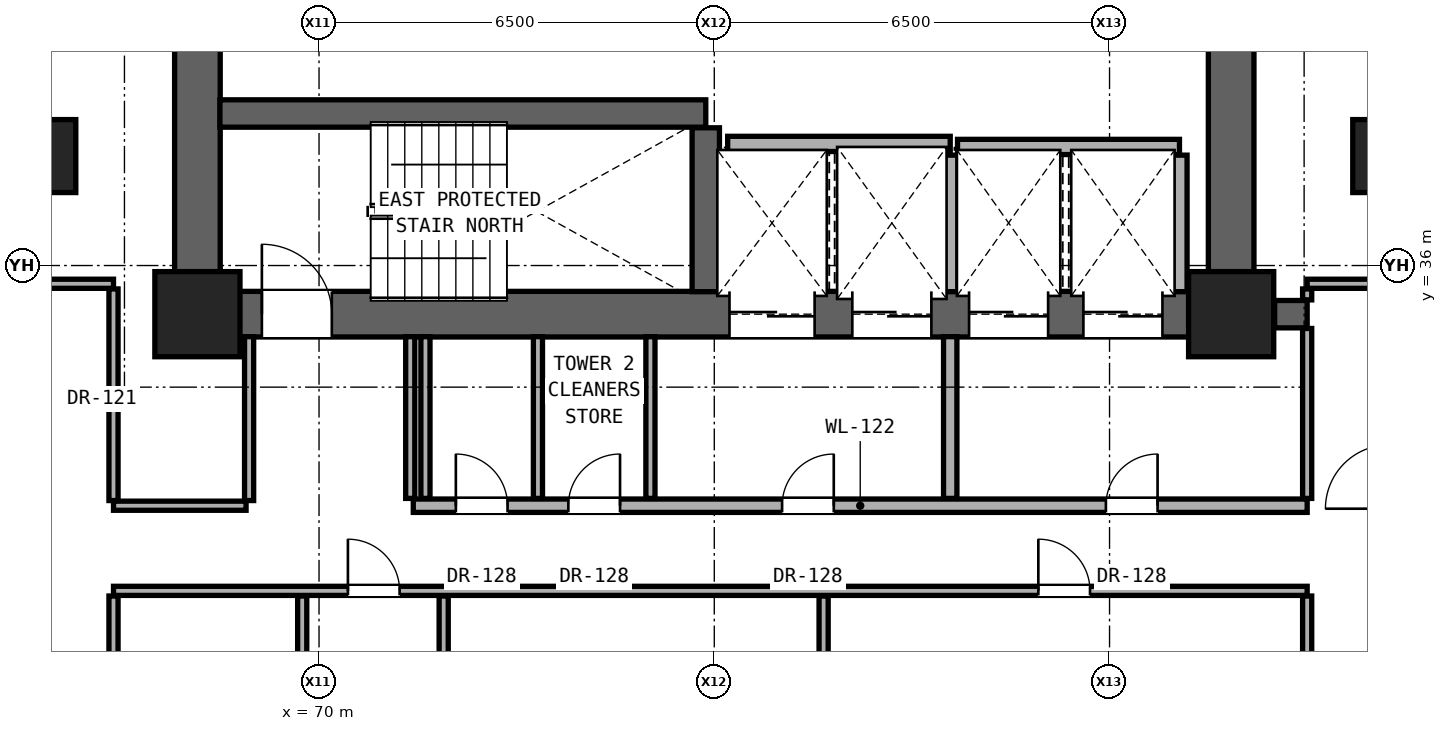
"""IFC4 building model, lengths in metres.
Left out: names, types, materials, properties, quantities, classifications, styles, units other than length and angle.
Written with IfcOpenShell. Run it as: python <this file> out.ifc"""

import sys

from ifc_helpers import new_model, si_unit, direction, frame, frame_2d, origin, origin_2d, place, context, subcontext, project, spatial, rectangle, extrude, element, fill, save


model = new_model("IFC4")
c1 = context("Model", 3, precision=1e-05, world=origin(), true_north=direction((0.0, 1.0)))
c2 = subcontext(c1, "Body", "Model", "MODEL_VIEW")
j1 = project(units=[si_unit("LENGTHUNIT", "METRE"), si_unit("PLANEANGLEUNIT", "RADIAN")], contexts=[c1])
p1 = place(None, origin())
s1 = spatial("IfcSite", under=j1, at=p1, CompositionType="ELEMENT")
p2 = place(p1, origin())
s2 = spatial("IfcBuilding", under=s1, at=p2, CompositionType="ELEMENT")
p3 = place(p2, frame((0.0, 0.0, 25.7)))
s3 = spatial("IfcBuildingStorey", under=s2, at=p3, CompositionType="ELEMENT", Elevation=25.7)
for number, where, z_axis, x_axis in (
    (1, (68.0, 35.2, 0.0), (0.0, 0.0, 1.0), (1.0, 0.0, 0.0)),
    (2, (85.0, 35.2, 0.0), (0.0, 0.0, 1.0), (1.0, 0.0, 0.0)),
):
    element("IfcColumn", number, at=place(p3, frame(where, z_axis=z_axis, x_axis=x_axis)), inside=s3, PredefinedType="COLUMN", context=c2, shape_type="SweptSolid", body=[
        extrude(rectangle(XDim=1.4, YDim=1.4, at=origin_2d()), origin(), (0.0, 0.0, 1.0), 3.3),
    ])
for number, where, z_axis, x_axis in (
    (3, (65.6, 37.8, 0.0), (0.0, 0.0, 1.0), (1.0, 0.0, 0.0)),
    (4, (87.4, 37.8, 0.0), (0.0, 0.0, 1.0), (1.0, 0.0, 0.0)),
):
    element("IfcColumn", number, at=place(p3, frame(where, z_axis=z_axis, x_axis=x_axis)), inside=s3, PredefinedType="PILASTER", context=c2, shape_type="SweptSolid", body=[
        extrude(rectangle(XDim=0.8, YDim=1.2, at=origin_2d()), origin(), (0.0, 0.0, 1.0), 3.3),
    ])
for number, where, z_axis, x_axis in (
    (5, (68.0, 35.2, 0.0), (0.0, 0.0, 1.0), (0.0, 1.0, 0.0)),
    (6, (85.0, 35.2, 0.0), (0.0, 0.0, 1.0), (0.0, 1.0, 0.0)),
):
    element("IfcWall", number, at=place(p3, frame(where, z_axis=z_axis, x_axis=x_axis)), inside=s3, PredefinedType="SHEAR", context=c2, shape_type="SweptSolid", body=[
        extrude(rectangle(XDim=5.6, YDim=0.75, at=frame_2d((2.8, 0.0))), origin(), (0.0, 0.0, 1.0), 3.06),
    ])
p4 = place(p3, frame((68.0, 35.2, 0.0), z_axis=(0.0, 0.0, 1.0), x_axis=(1.0, 0.0, 0.0)))
e7 = element("IfcWall", 7, at=p4, inside=s3, PredefinedType="SHEAR", context=c2, shape_type="SweptSolid", body=[
    extrude(rectangle(XDim=17.0, YDim=0.75, at=frame_2d((8.5, 0.0))), origin(), (0.0, 0.0, 1.0), 3.06),
])
p5 = place(p4, frame((1.06, 0.0, 0.0)))
e8 = element("IfcOpeningElement", 8, at=p5, cuts=e7, PredefinedType="OPENING", context=c2, shape_type="SweptSolid", body=[
    extrude(rectangle(XDim=1.15, YDim=2.2, at=frame_2d((0.575, 1.1))), frame((0.0, 0.385, 0.0), z_axis=(0.0, -1.0, 0.0), x_axis=(1.0, 0.0, 0.0)), (0.0, 0.0, 1.0), 0.77),
])
p6 = place(p4, frame((8.75, 0.0, 0.0)))
e9 = element("IfcOpeningElement", 9, at=p6, cuts=e7, PredefinedType="OPENING", context=c2, shape_type="SweptSolid", body=[
    extrude(rectangle(XDim=1.4, YDim=2.35, at=frame_2d((0.7, 1.175))), frame((0.0, 0.385, 0.0), z_axis=(0.0, -1.0, 0.0), x_axis=(1.0, 0.0, 0.0)), (0.0, 0.0, 1.0), 0.77),
])
p7 = place(p4, frame((10.77, 0.0, 0.0)))
e10 = element("IfcOpeningElement", 10, at=p7, cuts=e7, PredefinedType="OPENING", context=c2, shape_type="SweptSolid", body=[
    extrude(rectangle(XDim=1.3, YDim=2.3, at=frame_2d((0.65, 1.15))), frame((0.0, 0.385, 0.0), z_axis=(0.0, -1.0, 0.0), x_axis=(1.0, 0.0, 0.0)), (0.0, 0.0, 1.0), 0.77),
])
p8 = place(p4, frame((12.69, 0.0, 0.0)))
e11 = element("IfcOpeningElement", 11, at=p8, cuts=e7, PredefinedType="OPENING", context=c2, shape_type="SweptSolid", body=[
    extrude(rectangle(XDim=1.3, YDim=2.3, at=frame_2d((0.65, 1.15))), frame((0.0, 0.385, 0.0), z_axis=(0.0, -1.0, 0.0), x_axis=(1.0, 0.0, 0.0)), (0.0, 0.0, 1.0), 0.77),
])
p9 = place(p4, frame((14.57, 0.0, 0.0)))
e12 = element("IfcOpeningElement", 12, at=p9, cuts=e7, PredefinedType="OPENING", context=c2, shape_type="SweptSolid", body=[
    extrude(rectangle(XDim=1.3, YDim=2.3, at=frame_2d((0.65, 1.15))), frame((0.0, 0.385, 0.0), z_axis=(0.0, -1.0, 0.0), x_axis=(1.0, 0.0, 0.0)), (0.0, 0.0, 1.0), 0.77),
])
p10 = place(p3, frame((66.62, 30.65, 0.0), z_axis=(0.0, 0.0, 1.0), x_axis=(1.0, 0.0, 0.0)))
e13 = element("IfcWall", 13, at=p10, inside=s3, PredefinedType="PARTITIONING", context=c2, shape_type="SweptSolid", body=[
    extrude(rectangle(XDim=19.63, YDim=0.15, at=frame_2d((9.815, 0.0))), origin(), (0.0, 0.0, 1.0), 2.125),
])
p11 = place(p10, frame((3.855, 0.0, 0.0)))
e14 = element("IfcOpeningElement", 14, at=p11, cuts=e13, PredefinedType="OPENING", context=c2, shape_type="SweptSolid", body=[
    extrude(rectangle(XDim=0.85, YDim=2.01, at=frame_2d((0.425, 1.005))), frame((0.0, 0.085, 0.0), z_axis=(0.0, -1.0, 0.0), x_axis=(1.0, 0.0, 0.0)), (0.0, 0.0, 1.0), 0.17),
])
p12 = place(p10, frame((15.209, 0.0, 0.0)))
e15 = element("IfcOpeningElement", 15, at=p12, cuts=e13, PredefinedType="OPENING", context=c2, shape_type="SweptSolid", body=[
    extrude(rectangle(XDim=0.85, YDim=2.01, at=frame_2d((0.425, 1.005))), frame((0.0, 0.085, 0.0), z_axis=(0.0, -1.0, 0.0), x_axis=(1.0, 0.0, 0.0)), (0.0, 0.0, 1.0), 0.17),
])
p13 = place(p3, frame((66.62, 32.05, 0.0), z_axis=(0.0, 0.0, 1.0), x_axis=(1.0, 0.0, 0.0)))
e16 = element("IfcWall", 16, at=p13, inside=s3, PredefinedType="PARTITIONING", context=c2, shape_type="SweptSolid", body=[
    extrude(rectangle(XDim=2.18, YDim=0.15, at=frame_2d((1.09, 0.0))), origin(), (0.0, 0.0, 1.0), 2.125),
])
p14 = place(p3, frame((71.55, 32.05, 0.0), z_axis=(0.0, 0.0, 1.0), x_axis=(1.0, 0.0, 0.0)))
e17 = element("IfcWall", 17, at=p14, inside=s3, PredefinedType="SOLIDWALL", context=c2, shape_type="SweptSolid", body=[
    extrude(rectangle(XDim=14.7, YDim=0.22, at=frame_2d((7.35, 0.0))), origin(), (0.0, 0.0, 1.0), 2.125),
])
p15 = place(p14, frame((11.39, 0.0, 0.0)))
e18 = element("IfcOpeningElement", 18, at=p15, cuts=e17, PredefinedType="OPENING", context=c2, shape_type="SweptSolid", body=[
    extrude(rectangle(XDim=0.85, YDim=2.01, at=frame_2d((0.425, 1.005))), frame((0.0, 0.12, 0.0), z_axis=(0.0, -1.0, 0.0), x_axis=(1.0, 0.0, 0.0)), (0.0, 0.0, 1.0), 0.24),
])
p16 = place(p14, frame((6.065, 0.0, 0.0)))
e19 = element("IfcOpeningElement", 19, at=p16, cuts=e17, PredefinedType="OPENING", context=c2, shape_type="SweptSolid", body=[
    extrude(rectangle(XDim=0.85, YDim=2.01, at=frame_2d((0.425, 1.005))), frame((0.0, 0.12, 0.0), z_axis=(0.0, -1.0, 0.0), x_axis=(1.0, 0.0, 0.0)), (0.0, 0.0, 1.0), 0.24),
])
p17 = place(p14, frame((0.7, 0.0, 0.0)))
e20 = element("IfcOpeningElement", 20, at=p17, cuts=e17, PredefinedType="OPENING", context=c2, shape_type="SweptSolid", body=[
    extrude(rectangle(XDim=0.85, YDim=2.01, at=frame_2d((0.425, 1.005))), frame((0.0, 0.12, 0.0), z_axis=(0.0, -1.0, 0.0), x_axis=(1.0, 0.0, 0.0)), (0.0, 0.0, 1.0), 0.24),
])
p18 = place(p14, frame((2.55, 0.0, 0.0)))
e21 = element("IfcOpeningElement", 21, at=p18, cuts=e17, PredefinedType="OPENING", context=c2, shape_type="SweptSolid", body=[
    extrude(rectangle(XDim=0.85, YDim=2.01, at=frame_2d((0.425, 1.005))), frame((0.0, 0.12, 0.0), z_axis=(0.0, -1.0, 0.0), x_axis=(1.0, 0.0, 0.0)), (0.0, 0.0, 1.0), 0.24),
])
p19 = place(p3, frame((85.715, 35.2, 0.0), z_axis=(0.0, 0.0, 1.0), x_axis=(1.0, 0.0, 0.0)))
e22 = element("IfcWall", 22, at=p19, inside=s3, PredefinedType="SHEAR", context=c2, shape_type="SweptSolid", body=[
    extrude(rectangle(XDim=0.535, YDim=0.45, at=frame_2d((0.268, 0.0))), origin(), (0.0, 0.0, 1.0), 3.06),
])
p20 = place(p3, frame((65.25, 35.7, 0.0), z_axis=(0.0, 0.0, 1.0), x_axis=(1.0, 0.0, 0.0)))
e23 = element("IfcWall", 23, at=p20, inside=s3, PredefinedType="PARTITIONING", context=c2, shape_type="SweptSolid", body=[
    extrude(rectangle(XDim=1.37, YDim=0.15, at=frame_2d((0.685, 0.0))), origin(), (0.0, 0.0, 1.0), 3.06),
])
p21 = place(p3, frame((86.25, 35.7, 0.0), z_axis=(0.0, 0.0, 1.0), x_axis=(1.0, 0.0, 0.0)))
e24 = element("IfcWall", 24, at=p21, inside=s3, PredefinedType="PARTITIONING", context=c2, shape_type="SweptSolid", body=[
    extrude(rectangle(XDim=1.35, YDim=0.15, at=frame_2d((0.675, 0.0))), origin(), (0.0, 0.0, 1.0), 3.06),
])
p22 = place(p3, frame((80.5, 37.95, 0.0), z_axis=(0.0, 0.0, 1.0), x_axis=(1.0, 0.0, 0.0)))
e25 = element("IfcWall", 25, at=p22, inside=s3, PredefinedType="SOLIDWALL", context=c2, shape_type="SweptSolid", body=[
    extrude(rectangle(XDim=3.65, YDim=0.25, at=frame_2d((1.825, 0.0))), origin(), (0.0, 0.0, 1.0), 3.06),
])
p23 = place(p3, frame((76.72, 38.0, 0.0), z_axis=(0.0, 0.0, 1.0), x_axis=(1.0, 0.0, 0.0)))
e26 = element("IfcWall", 26, at=p23, inside=s3, PredefinedType="SOLIDWALL", context=c2, shape_type="SweptSolid", body=[
    extrude(rectangle(XDim=3.66, YDim=0.25, at=frame_2d((1.83, 0.0))), origin(), (0.0, 0.0, 1.0), 3.06),
])
p24 = place(p3, frame((68.37, 38.5, 0.0), z_axis=(0.0, 0.0, 1.0), x_axis=(1.0, 0.0, 0.0)))
e27 = element("IfcWall", 27, at=p24, inside=s3, PredefinedType="SHEAR", context=c2, shape_type="SweptSolid", body=[
    extrude(rectangle(XDim=7.99, YDim=0.45, at=frame_2d((3.995, 0.0))), origin(), (0.0, 0.0, 1.0), 3.06),
])
p25 = place(p3, frame((66.62, 24.935, 0.0), z_axis=(0.0, 0.0, 1.0), x_axis=(0.0, 1.0, 0.0)))
e28 = element("IfcWall", 28, at=p25, inside=s3, PredefinedType="PARTITIONING", context=c2, shape_type="SweptSolid", body=[
    extrude(rectangle(XDim=5.63, YDim=0.15, at=frame_2d((2.815, 0.0))), origin(), (0.0, 0.0, 1.0), 2.279),
])
p26 = place(p25, frame((2.34, 0.0, 0.0)))
e29 = element("IfcOpeningElement", 29, at=p26, cuts=e28, PredefinedType="OPENING", context=c2, shape_type="SweptSolid", body=[
    extrude(rectangle(XDim=0.95, YDim=2.15, at=frame_2d((0.475, 1.075))), frame((0.0, 0.085, 0.0), z_axis=(0.0, -1.0, 0.0), x_axis=(1.0, 0.0, 0.0)), (0.0, 0.0, 1.0), 0.17),
])
p27 = place(p3, frame((66.62, 32.135, 0.0), z_axis=(0.0, 0.0, 1.0), x_axis=(0.0, 1.0, 0.0)))
e30 = element("IfcWall", 30, at=p27, inside=s3, PredefinedType="PARTITIONING", context=c2, shape_type="SweptSolid", body=[
    extrude(rectangle(XDim=3.48, YDim=0.15, at=frame_2d((1.74, 0.0))), origin(), (0.0, 0.0, 1.0), 2.452),
])
p28 = place(p3, frame((68.85, 32.135, 0.0), z_axis=(0.0, 0.0, 1.0), x_axis=(0.0, 1.0, 0.0)))
e31 = element("IfcWall", 31, at=p28, inside=s3, PredefinedType="PARTITIONING", context=c2, shape_type="SweptSolid", body=[
    extrude(rectangle(XDim=2.695, YDim=0.15, at=frame_2d((1.348, 0.0))), origin(), (0.0, 0.0, 1.0), 3.06),
])
p29 = place(p3, frame((69.723, 24.935, 0.0), z_axis=(0.0, 0.0, 1.0), x_axis=(0.0, 1.0, 0.0)))
e32 = element("IfcWall", 32, at=p29, inside=s3, PredefinedType="PARTITIONING", context=c2, shape_type="SweptSolid", body=[
    extrude(rectangle(XDim=5.63, YDim=0.15, at=frame_2d((2.815, 0.0))), origin(), (0.0, 0.0, 1.0), 2.125),
])
for number, where, z_axis, x_axis in (
    (33, (71.5, 32.17, 0.0), (0.0, 0.0, 1.0), (0.0, 1.0, 0.0)),
    (34, (71.75, 32.17, 0.0), (0.0, 0.0, 1.0), (0.0, 1.0, 0.0)),
):
    element("IfcWall", number, at=place(p3, frame(where, z_axis=z_axis, x_axis=x_axis)), inside=s3, PredefinedType="PARTITIONING", context=c2, shape_type="SweptSolid", body=[
        extrude(rectangle(XDim=2.66, YDim=0.15, at=frame_2d((1.33, 0.0))), origin(), (0.0, 0.0, 1.0), 3.06),
    ])
p30 = place(p3, frame((72.05, 22.435, 0.0), z_axis=(0.0, 0.0, 1.0), x_axis=(0.0, 1.0, 0.0)))
e35 = element("IfcWall", 35, at=p30, inside=s3, PredefinedType="PARTITIONING", context=c2, shape_type="SweptSolid", body=[
    extrude(rectangle(XDim=8.13, YDim=0.15, at=frame_2d((4.065, 0.0))), origin(), (0.0, 0.0, 1.0), 2.125),
])
for number, where, z_axis, x_axis in (
    (36, (73.6, 32.17, 0.0), (0.0, 0.0, 1.0), (0.0, 1.0, 0.0)),
    (37, (75.45, 32.17, 0.0), (0.0, 0.0, 1.0), (0.0, 1.0, 0.0)),
):
    element("IfcWall", number, at=place(p3, frame(where, z_axis=z_axis, x_axis=x_axis)), inside=s3, PredefinedType="PARTITIONING", context=c2, shape_type="SweptSolid", body=[
        extrude(rectangle(XDim=2.66, YDim=0.15, at=frame_2d((1.33, 0.0))), origin(), (0.0, 0.0, 1.0), 3.06),
    ])
p31 = place(p3, frame((76.36, 35.57, 0.0), z_axis=(0.0, 0.0, 1.0), x_axis=(0.0, 1.0, 0.0)))
e38 = element("IfcWall", 38, at=p31, inside=s3, PredefinedType="SHEAR", context=c2, shape_type="SweptSolid", body=[
    extrude(rectangle(XDim=2.695, YDim=0.45, at=frame_2d((1.347, 0.0))), origin(), (0.0, 0.0, 1.0), 3.06),
])
p32 = place(p3, frame((78.298, 22.435, 0.0), z_axis=(0.0, 0.0, 1.0), x_axis=(0.0, 1.0, 0.0)))
e39 = element("IfcWall", 39, at=p32, inside=s3, PredefinedType="PARTITIONING", context=c2, shape_type="SweptSolid", body=[
    extrude(rectangle(XDim=8.13, YDim=0.15, at=frame_2d((4.065, 0.0))), origin(), (0.0, 0.0, 1.0), 2.125),
])
p33 = place(p3, frame((80.38, 32.17, 0.0), z_axis=(0.0, 0.0, 1.0), x_axis=(0.0, 1.0, 0.0)))
e40 = element("IfcWall", 40, at=p33, inside=s3, PredefinedType="SOLIDWALL", context=c2, shape_type="SweptSolid", body=[
    extrude(rectangle(XDim=2.66, YDim=0.22, at=frame_2d((1.33, 0.0))), origin(), (0.0, 0.0, 1.0), 3.06),
])
for number, where, z_axis, x_axis in (
    (41, (80.38, 35.57, 0.0), (0.0, 0.0, 1.0), (0.0, 1.0, 0.0)),
    (42, (84.15, 35.57, 0.0), (0.0, 0.0, 1.0), (0.0, 1.0, 0.0)),
):
    element("IfcWall", number, at=place(p3, frame(where, z_axis=z_axis, x_axis=x_axis)), inside=s3, PredefinedType="SOLIDWALL", context=c2, shape_type="SweptSolid", body=[
        extrude(rectangle(XDim=2.245, YDim=0.25, at=frame_2d((1.123, 0.0))), origin(), (0.0, 0.0, 1.0), 3.06),
    ])
p34 = place(p3, frame((86.25, 22.435, 0.0), z_axis=(0.0, 0.0, 1.0), x_axis=(0.0, 1.0, 0.0)))
e43 = element("IfcWall", 43, at=p34, inside=s3, PredefinedType="PARTITIONING", context=c2, shape_type="SweptSolid", body=[
    extrude(rectangle(XDim=8.13, YDim=0.15, at=frame_2d((4.065, 0.0))), origin(), (0.0, 0.0, 1.0), 2.279),
])
p35 = place(p3, frame((86.25, 32.17, 0.0), z_axis=(0.0, 0.0, 1.0), x_axis=(0.0, 1.0, 0.0)))
e44 = element("IfcWall", 44, at=p35, inside=s3, PredefinedType="PARTITIONING", context=c2, shape_type="SweptSolid", body=[
    extrude(rectangle(XDim=2.795, YDim=0.15, at=frame_2d((1.397, 0.0))), origin(), (0.0, 0.0, 1.0), 2.452),
])
p36 = place(p3, frame((86.25, 35.435, 0.0), z_axis=(0.0, 0.0, 1.0), x_axis=(0.0, 1.0, 0.0)))
e45 = element("IfcWall", 45, at=p36, inside=s3, PredefinedType="PARTITIONING", context=c2, shape_type="SweptSolid", body=[
    extrude(rectangle(XDim=0.18, YDim=0.15, at=frame_2d((0.09, 0.0))), origin(), (0.0, 0.0, 1.0), 2.452),
])
p37 = place(p15, origin())
e46 = element("IfcDoor", 46, at=p37, inside=s3, OperationType="SINGLE_SWING_RIGHT", PredefinedType="DOOR", context=c2, shape_type="SweptSolid", body=[
    extrude(rectangle(XDim=0.85, YDim=2.01, at=frame_2d((0.425, 1.005))), frame((0.0, 0.025, 0.0), z_axis=(0.0, -1.0, 0.0), x_axis=(1.0, 0.0, 0.0)), (0.0, 0.0, 1.0), 0.05),
])
fill(e18, e46)
p38 = place(p5, origin())
e47 = element("IfcDoor", 47, at=p38, inside=s3, OperationType="SINGLE_SWING_LEFT", PredefinedType="DOOR", context=c2, shape_type="SweptSolid", body=[
    extrude(rectangle(XDim=1.15, YDim=2.2, at=frame_2d((0.575, 1.1))), frame((0.0, 0.025, 0.0), z_axis=(0.0, -1.0, 0.0), x_axis=(1.0, 0.0, 0.0)), (0.0, 0.0, 1.0), 0.05),
])
fill(e8, e47)
p39 = place(p16, origin())
e48 = element("IfcDoor", 48, at=p39, inside=s3, OperationType="SINGLE_SWING_RIGHT", PredefinedType="DOOR", context=c2, shape_type="SweptSolid", body=[
    extrude(rectangle(XDim=0.85, YDim=2.01, at=frame_2d((0.425, 1.005))), frame((0.0, 0.025, 0.0), z_axis=(0.0, -1.0, 0.0), x_axis=(1.0, 0.0, 0.0)), (0.0, 0.0, 1.0), 0.05),
])
fill(e19, e48)
p40 = place(p17, origin())
e49 = element("IfcDoor", 49, at=p40, inside=s3, OperationType="SINGLE_SWING_LEFT", PredefinedType="DOOR", context=c2, shape_type="SweptSolid", body=[
    extrude(rectangle(XDim=0.85, YDim=2.01, at=frame_2d((0.425, 1.005))), frame((0.0, 0.025, 0.0), z_axis=(0.0, -1.0, 0.0), x_axis=(1.0, 0.0, 0.0)), (0.0, 0.0, 1.0), 0.05),
])
fill(e20, e49)
p41 = place(p18, origin())
e50 = element("IfcDoor", 50, at=p41, inside=s3, OperationType="SINGLE_SWING_RIGHT", PredefinedType="DOOR", context=c2, shape_type="SweptSolid", body=[
    extrude(rectangle(XDim=0.85, YDim=2.01, at=frame_2d((0.425, 1.005))), frame((0.0, 0.025, 0.0), z_axis=(0.0, -1.0, 0.0), x_axis=(1.0, 0.0, 0.0)), (0.0, 0.0, 1.0), 0.05),
])
fill(e21, e50)
p42 = place(p11, origin())
e51 = element("IfcDoor", 51, at=p42, inside=s3, OperationType="SINGLE_SWING_LEFT", PredefinedType="DOOR", context=c2, shape_type="SweptSolid", body=[
    extrude(rectangle(XDim=0.85, YDim=2.01, at=frame_2d((0.425, 1.005))), frame((0.0, 0.025, 0.0), z_axis=(0.0, -1.0, 0.0), x_axis=(1.0, 0.0, 0.0)), (0.0, 0.0, 1.0), 0.05),
])
fill(e14, e51)
p43 = place(p12, origin())
e52 = element("IfcDoor", 52, at=p43, inside=s3, OperationType="SINGLE_SWING_LEFT", PredefinedType="DOOR", context=c2, shape_type="SweptSolid", body=[
    extrude(rectangle(XDim=0.85, YDim=2.01, at=frame_2d((0.425, 1.005))), frame((0.0, 0.025, 0.0), z_axis=(0.0, -1.0, 0.0), x_axis=(1.0, 0.0, 0.0)), (0.0, 0.0, 1.0), 0.05),
])
fill(e15, e52)
p44 = place(p6, origin())
e53 = element("IfcDoor", 53, at=p44, inside=s3, OperationType="DOUBLE_DOOR_SLIDING", PredefinedType="DOOR", context=c2, shape_type="SweptSolid", body=[
    extrude(rectangle(XDim=1.4, YDim=2.35, at=frame_2d((0.7, 1.175))), frame((0.0, 0.025, 0.0), z_axis=(0.0, -1.0, 0.0), x_axis=(1.0, 0.0, 0.0)), (0.0, 0.0, 1.0), 0.05),
])
fill(e9, e53)
p45 = place(p7, origin())
e54 = element("IfcDoor", 54, at=p45, inside=s3, OperationType="DOUBLE_DOOR_SLIDING", PredefinedType="DOOR", context=c2, shape_type="SweptSolid", body=[
    extrude(rectangle(XDim=1.3, YDim=2.3, at=frame_2d((0.65, 1.15))), frame((0.0, 0.025, 0.0), z_axis=(0.0, -1.0, 0.0), x_axis=(1.0, 0.0, 0.0)), (0.0, 0.0, 1.0), 0.05),
])
fill(e10, e54)
p46 = place(p8, origin())
e55 = element("IfcDoor", 55, at=p46, inside=s3, OperationType="DOUBLE_DOOR_SLIDING", PredefinedType="DOOR", context=c2, shape_type="SweptSolid", body=[
    extrude(rectangle(XDim=1.3, YDim=2.3, at=frame_2d((0.65, 1.15))), frame((0.0, 0.025, 0.0), z_axis=(0.0, -1.0, 0.0), x_axis=(1.0, 0.0, 0.0)), (0.0, 0.0, 1.0), 0.05),
])
fill(e11, e55)
p47 = place(p9, origin())
e56 = element("IfcDoor", 56, at=p47, inside=s3, OperationType="DOUBLE_DOOR_SLIDING", PredefinedType="DOOR", context=c2, shape_type="SweptSolid", body=[
    extrude(rectangle(XDim=1.3, YDim=2.3, at=frame_2d((0.65, 1.15))), frame((0.0, 0.025, 0.0), z_axis=(0.0, -1.0, 0.0), x_axis=(1.0, 0.0, 0.0)), (0.0, 0.0, 1.0), 0.05),
])
fill(e12, e56)
save(model, sys.argv[1])
